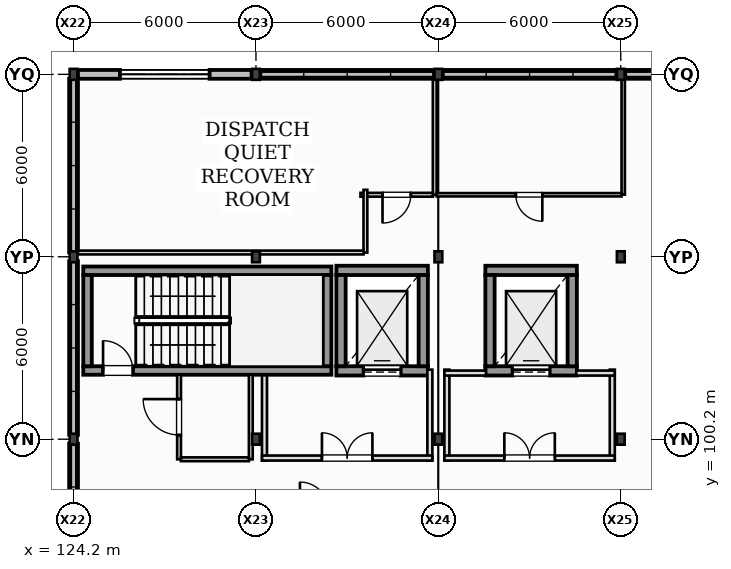
"""IFC4 building model, lengths in metres.
Left out: names, types, materials, properties, quantities, classifications, styles, units other than length and angle.
Written with IfcOpenShell. Run it as: python <this file> out.ifc"""

import sys

from ifc_helpers import new_model, si_unit, direction, frame, frame_2d, origin, origin_2d, place, context, subcontext, project, spatial, rectangle, i_section, extrude, element, fill, save


model = new_model("IFC4")
c1 = context("Model", 3, precision=1e-05, world=origin(), true_north=direction((0.0, 1.0)))
c2 = subcontext(c1, "Body", "Model", "MODEL_VIEW")
j1 = project(units=[si_unit("LENGTHUNIT", "METRE"), si_unit("PLANEANGLEUNIT", "RADIAN")], contexts=[c1])
p1 = place(None, origin())
s1 = spatial("IfcSite", under=j1, at=p1, CompositionType="ELEMENT")
p2 = place(p1, origin())
s2 = spatial("IfcBuilding", under=s1, at=p2, CompositionType="ELEMENT")
p3 = place(p2, frame((0.0, 0.0, 14.0)))
s3 = spatial("IfcBuildingStorey", under=s2, at=p3, CompositionType="ELEMENT", Elevation=14.0)
for number, where, z_axis, x_axis in (
    (1, (124.2, 100.2, 0.0), (0.0, 0.0, 1.0), (1.0, 0.0, 0.0)),
    (2, (124.2, 106.2, 0.0), (0.0, 0.0, 1.0), (1.0, 0.0, 0.0)),
    (3, (124.2, 112.2, 0.0), (0.0, 0.0, 1.0), (1.0, 0.0, 0.0)),
    (4, (130.2, 100.2, 0.0), (0.0, 0.0, 1.0), (1.0, 0.0, 0.0)),
    (5, (130.2, 106.2, 0.0), (0.0, 0.0, 1.0), (1.0, 0.0, 0.0)),
    (6, (130.2, 112.2, 0.0), (0.0, 0.0, 1.0), (1.0, 0.0, 0.0)),
    (7, (136.2, 100.2, 0.0), (0.0, 0.0, 1.0), (1.0, 0.0, 0.0)),
    (8, (136.2, 106.2, 0.0), (0.0, 0.0, 1.0), (1.0, 0.0, 0.0)),
    (9, (136.2, 112.2, 0.0), (0.0, 0.0, 1.0), (1.0, 0.0, 0.0)),
    (10, (142.2, 100.2, 0.0), (0.0, 0.0, 1.0), (1.0, 0.0, 0.0)),
    (11, (142.2, 106.2, 0.0), (0.0, 0.0, 1.0), (1.0, 0.0, 0.0)),
    (12, (142.2, 112.2, 0.0), (0.0, 0.0, 1.0), (1.0, 0.0, 0.0)),
):
    element("IfcColumn", number, at=place(p3, frame(where, z_axis=z_axis, x_axis=x_axis)), inside=s3, PredefinedType="COLUMN", context=c2, shape_type="SweptSolid", body=[
        extrude(i_section(OverallWidth=0.256, OverallDepth=0.36, WebThickness=0.011, FlangeThickness=0.02, at=origin_2d()), origin(), (0.0, 0.0, 1.0), 4.0),
    ])
p4 = place(p3, frame((130.055, 112.2, 0.0), z_axis=(0.0, 0.0, 1.0), x_axis=(-1.0, 0.0, 0.0)))
e13 = element("IfcWall", 13, at=p4, inside=s3, PredefinedType="STANDARD", context=c2, shape_type="SweptSolid", body=[
    extrude(rectangle(XDim=5.71, YDim=0.29, at=frame_2d((2.855, 0.0))), origin(), (0.0, 0.0, 1.0), 3.269),
])
p5 = place(p4, frame((1.38, 0.0, 1.0)))
e14 = element("IfcOpeningElement", 14, at=p5, cuts=e13, PredefinedType="OPENING", context=c2, shape_type="SweptSolid", body=[
    extrude(rectangle(XDim=2.95, YDim=1.55, at=frame_2d((1.475, 0.775))), frame((0.0, 0.155, 0.0), z_axis=(0.0, -1.0, 0.0), x_axis=(1.0, 0.0, 0.0)), (0.0, 0.0, 1.0), 0.31),
])
p6 = place(p3, frame((136.055, 112.2, 0.0), z_axis=(0.0, 0.0, 1.0), x_axis=(-1.0, 0.0, 0.0)))
e15 = element("IfcWall", 15, at=p6, inside=s3, PredefinedType="STANDARD", context=c2, shape_type="SweptSolid", body=[
    extrude(rectangle(XDim=5.71, YDim=0.29, at=frame_2d((2.855, 0.0))), origin(), (0.0, 0.0, 1.0), 0.32),
])
p7 = place(p3, frame((142.055, 112.2, 0.0), z_axis=(0.0, 0.0, 1.0), x_axis=(-1.0, 0.0, 0.0)))
e16 = element("IfcWall", 16, at=p7, inside=s3, PredefinedType="STANDARD", context=c2, shape_type="SweptSolid", body=[
    extrude(rectangle(XDim=5.71, YDim=0.29, at=frame_2d((2.855, 0.0))), origin(), (0.0, 0.0, 1.0), 0.44),
])
p8 = place(p3, frame((148.055, 112.2, 0.0), z_axis=(0.0, 0.0, 1.0), x_axis=(-1.0, 0.0, 0.0)))
e17 = element("IfcWall", 17, at=p8, inside=s3, PredefinedType="STANDARD", context=c2, shape_type="SweptSolid", body=[
    extrude(rectangle(XDim=5.71, YDim=0.29, at=frame_2d((2.855, 0.0))), origin(), (0.0, 0.0, 1.0), 0.56),
])
p9 = place(p3, frame((124.2, 100.055, 0.0), z_axis=(0.0, 0.0, 1.0), x_axis=(0.0, -1.0, 0.0)))
e18 = element("IfcWall", 18, at=p9, inside=s3, PredefinedType="STANDARD", context=c2, shape_type="SweptSolid", body=[
    extrude(rectangle(XDim=5.71, YDim=0.29, at=frame_2d((2.855, 0.0))), origin(), (0.0, 0.0, 1.0), 0.8),
])
p10 = place(p3, frame((124.2, 106.055, 0.0), z_axis=(0.0, 0.0, 1.0), x_axis=(0.0, -1.0, 0.0)))
e19 = element("IfcWall", 19, at=p10, inside=s3, PredefinedType="STANDARD", context=c2, shape_type="SweptSolid", body=[
    extrude(rectangle(XDim=5.71, YDim=0.29, at=frame_2d((2.855, 0.0))), origin(), (0.0, 0.0, 1.0), 0.92),
])
p11 = place(p3, frame((124.2, 112.055, 0.0), z_axis=(0.0, 0.0, 1.0), x_axis=(0.0, -1.0, 0.0)))
e20 = element("IfcWall", 20, at=p11, inside=s3, PredefinedType="STANDARD", context=c2, shape_type="SweptSolid", body=[
    extrude(rectangle(XDim=5.71, YDim=0.29, at=frame_2d((2.855, 0.0))), origin(), (0.0, 0.0, 1.0), 0.32),
])
p12 = place(p3, frame((124.52, 102.46, 0.0), z_axis=(0.0, 0.0, 1.0), x_axis=(1.0, 0.0, 0.0)))
e21 = element("IfcWall", 21, at=p12, inside=s3, PredefinedType="SHEAR", context=c2, shape_type="SweptSolid", body=[
    extrude(rectangle(XDim=8.16, YDim=0.28, at=frame_2d((4.08, 0.0))), origin(), (0.0, 0.0, 1.0), 4.0),
])
p13 = place(p12, frame((0.65, 0.0, 0.0)))
e22 = element("IfcOpeningElement", 22, at=p13, cuts=e21, PredefinedType="OPENING", context=c2, shape_type="SweptSolid", body=[
    extrude(rectangle(XDim=0.98, YDim=2.15, at=frame_2d((0.49, 1.075))), frame((0.0, 0.15, 0.0), z_axis=(0.0, -1.0, 0.0), x_axis=(1.0, 0.0, 0.0)), (0.0, 0.0, 1.0), 0.3),
])
p14 = place(p3, frame((132.68, 105.74, 0.0), z_axis=(0.0, 0.0, 1.0), x_axis=(-1.0, 0.0, 0.0)))
e23 = element("IfcWall", 23, at=p14, inside=s3, PredefinedType="SHEAR", context=c2, shape_type="SweptSolid", body=[
    extrude(rectangle(XDim=8.16, YDim=0.28, at=frame_2d((4.08, 0.0))), origin(), (0.0, 0.0, 1.0), 4.0),
])
for number, where, z_axis, x_axis in (
    (24, (124.66, 105.6, 0.0), (0.0, 0.0, 1.0), (0.0, -1.0, 0.0)),
    (25, (132.54, 102.6, 0.0), (0.0, 0.0, 1.0), (0.0, 1.0, 0.0)),
):
    element("IfcWall", number, at=place(p3, frame(where, z_axis=z_axis, x_axis=x_axis)), inside=s3, PredefinedType="SHEAR", context=c2, shape_type="SweptSolid", body=[
        extrude(rectangle(XDim=3.0, YDim=0.28, at=frame_2d((1.5, 0.0))), origin(), (0.0, 0.0, 1.0), 4.0),
    ])
p15 = place(p3, frame((132.845, 102.448, 0.0), z_axis=(0.0, 0.0, 1.0), x_axis=(1.0, 0.0, 0.0)))
e26 = element("IfcWall", 26, at=p15, inside=s3, PredefinedType="SHEAR", context=c2, shape_type="SweptSolid", body=[
    extrude(rectangle(XDim=3.01, YDim=0.305, at=frame_2d((1.505, 0.0))), origin(), (0.0, 0.0, 1.0), 4.0),
])
p16 = place(p15, frame((0.895, 0.0, 0.0)))
e27 = element("IfcOpeningElement", 27, at=p16, cuts=e26, PredefinedType="OPENING", context=c2, shape_type="SweptSolid", body=[
    extrude(rectangle(XDim=1.22, YDim=2.22, at=frame_2d((0.61, 1.11))), frame((0.0, 0.162, 0.0), z_axis=(0.0, -1.0, 0.0), x_axis=(1.0, 0.0, 0.0)), (0.0, 0.0, 1.0), 0.325),
])
p17 = place(p3, frame((135.855, 105.752, 0.0), z_axis=(0.0, 0.0, 1.0), x_axis=(-1.0, 0.0, 0.0)))
e28 = element("IfcWall", 28, at=p17, inside=s3, PredefinedType="SHEAR", context=c2, shape_type="SweptSolid", body=[
    extrude(rectangle(XDim=3.01, YDim=0.305, at=frame_2d((1.505, 0.0))), origin(), (0.0, 0.0, 1.0), 4.0),
])
for number, where, z_axis, x_axis in (
    (29, (132.998, 105.6, 0.0), (0.0, 0.0, 1.0), (0.0, -1.0, 0.0)),
    (30, (135.702, 102.6, 0.0), (0.0, 0.0, 1.0), (0.0, 1.0, 0.0)),
):
    element("IfcWall", number, at=place(p3, frame(where, z_axis=z_axis, x_axis=x_axis)), inside=s3, PredefinedType="SHEAR", context=c2, shape_type="SweptSolid", body=[
        extrude(rectangle(XDim=3.0, YDim=0.305, at=frame_2d((1.5, 0.0))), origin(), (0.0, 0.0, 1.0), 4.0),
    ])
for number, where, z_axis, x_axis in (
    (31, (130.48, 99.5, 0.0), (0.0, 0.0, 1.0), (0.0, 1.0, 0.0)),
    (32, (135.92, 102.488, 0.0), (0.0, 0.0, 1.0), (0.0, -1.0, 0.0)),
):
    element("IfcWall", number, at=place(p3, frame(where, z_axis=z_axis, x_axis=x_axis)), inside=s3, PredefinedType="PARTITIONING", context=c2, shape_type="SweptSolid", body=[
        extrude(rectangle(XDim=2.988, YDim=0.165, at=frame_2d((1.494, 0.0))), origin(), (0.0, 0.0, 1.0), 3.273),
    ])
p18 = place(p3, frame((130.4, 99.58, 0.0), z_axis=(0.0, 0.0, 1.0), x_axis=(1.0, 0.0, 0.0)))
e33 = element("IfcWall", 33, at=p18, inside=s3, PredefinedType="PARTITIONING", context=c2, shape_type="SweptSolid", body=[
    extrude(rectangle(XDim=5.6, YDim=0.165, at=frame_2d((2.8, 0.0))), origin(), (0.0, 0.0, 1.0), 3.76),
])
p19 = place(p18, frame((1.97, 0.0, 0.0)))
e34 = element("IfcOpeningElement", 34, at=p19, cuts=e33, PredefinedType="OPENING", context=c2, shape_type="SweptSolid", body=[
    extrude(rectangle(XDim=1.66, YDim=2.2, at=frame_2d((0.83, 1.1))), frame((0.0, 0.093, 0.0), z_axis=(0.0, -1.0, 0.0), x_axis=(1.0, 0.0, 0.0)), (0.0, 0.0, 1.0), 0.185),
])
p20 = place(p3, frame((137.745, 102.448, 0.0), z_axis=(0.0, 0.0, 1.0), x_axis=(1.0, 0.0, 0.0)))
e35 = element("IfcWall", 35, at=p20, inside=s3, PredefinedType="SHEAR", context=c2, shape_type="SweptSolid", body=[
    extrude(rectangle(XDim=3.01, YDim=0.305, at=frame_2d((1.505, 0.0))), origin(), (0.0, 0.0, 1.0), 4.0),
])
p21 = place(p20, frame((0.895, 0.0, 0.0)))
e36 = element("IfcOpeningElement", 36, at=p21, cuts=e35, PredefinedType="OPENING", context=c2, shape_type="SweptSolid", body=[
    extrude(rectangle(XDim=1.22, YDim=2.22, at=frame_2d((0.61, 1.11))), frame((0.0, 0.162, 0.0), z_axis=(0.0, -1.0, 0.0), x_axis=(1.0, 0.0, 0.0)), (0.0, 0.0, 1.0), 0.325),
])
p22 = place(p3, frame((140.755, 105.752, 0.0), z_axis=(0.0, 0.0, 1.0), x_axis=(-1.0, 0.0, 0.0)))
e37 = element("IfcWall", 37, at=p22, inside=s3, PredefinedType="SHEAR", context=c2, shape_type="SweptSolid", body=[
    extrude(rectangle(XDim=3.01, YDim=0.305, at=frame_2d((1.505, 0.0))), origin(), (0.0, 0.0, 1.0), 4.0),
])
for number, where, z_axis, x_axis in (
    (38, (137.897, 105.6, 0.0), (0.0, 0.0, 1.0), (0.0, -1.0, 0.0)),
    (39, (140.603, 102.6, 0.0), (0.0, 0.0, 1.0), (0.0, 1.0, 0.0)),
):
    element("IfcWall", number, at=place(p3, frame(where, z_axis=z_axis, x_axis=x_axis)), inside=s3, PredefinedType="SHEAR", context=c2, shape_type="SweptSolid", body=[
        extrude(rectangle(XDim=3.0, YDim=0.305, at=frame_2d((1.5, 0.0))), origin(), (0.0, 0.0, 1.0), 4.0),
    ])
for number, where, z_axis, x_axis in (
    (40, (136.48, 99.5, 0.0), (0.0, 0.0, 1.0), (0.0, 1.0, 0.0)),
    (41, (141.92, 102.488, 0.0), (0.0, 0.0, 1.0), (0.0, -1.0, 0.0)),
):
    element("IfcWall", number, at=place(p3, frame(where, z_axis=z_axis, x_axis=x_axis)), inside=s3, PredefinedType="PARTITIONING", context=c2, shape_type="SweptSolid", body=[
        extrude(rectangle(XDim=2.988, YDim=0.165, at=frame_2d((1.494, 0.0))), origin(), (0.0, 0.0, 1.0), 3.273),
    ])
p23 = place(p3, frame((136.4, 102.375, 0.0), z_axis=(0.0, 0.0, 1.0), x_axis=(1.0, 0.0, 0.0)))
e42 = element("IfcWall", 42, at=p23, inside=s3, PredefinedType="PARTITIONING", context=c2, shape_type="SweptSolid", body=[
    extrude(rectangle(XDim=1.365, YDim=0.165, at=frame_2d((0.683, 0.0))), origin(), (0.0, 0.0, 1.0), 3.76),
])
p24 = place(p3, frame((140.735, 102.375, 0.0), z_axis=(0.0, 0.0, 1.0), x_axis=(1.0, 0.0, 0.0)))
e43 = element("IfcWall", 43, at=p24, inside=s3, PredefinedType="PARTITIONING", context=c2, shape_type="SweptSolid", body=[
    extrude(rectangle(XDim=1.265, YDim=0.165, at=frame_2d((0.632, 0.0))), origin(), (0.0, 0.0, 1.0), 3.76),
])
p25 = place(p3, frame((136.4, 99.58, 0.0), z_axis=(0.0, 0.0, 1.0), x_axis=(1.0, 0.0, 0.0)))
e44 = element("IfcWall", 44, at=p25, inside=s3, PredefinedType="PARTITIONING", context=c2, shape_type="SweptSolid", body=[
    extrude(rectangle(XDim=5.6, YDim=0.165, at=frame_2d((2.8, 0.0))), origin(), (0.0, 0.0, 1.0), 3.76),
])
p26 = place(p25, frame((1.97, 0.0, 0.0)))
e45 = element("IfcOpeningElement", 45, at=p26, cuts=e44, PredefinedType="OPENING", context=c2, shape_type="SweptSolid", body=[
    extrude(rectangle(XDim=1.66, YDim=2.2, at=frame_2d((0.83, 1.1))), frame((0.0, 0.093, 0.0), z_axis=(0.0, -1.0, 0.0), x_axis=(1.0, 0.0, 0.0)), (0.0, 0.0, 1.0), 0.185),
])
p27 = place(p3, frame((136.08, 112.055, 0.0), z_axis=(0.0, 0.0, 1.0), x_axis=(0.0, -1.0, 0.0)))
e46 = element("IfcWall", 46, at=p27, inside=s3, PredefinedType="PARTITIONING", context=c2, shape_type="SweptSolid", body=[
    extrude(rectangle(XDim=3.817, YDim=0.125, at=frame_2d((1.909, 0.0))), origin(), (0.0, 0.0, 1.0), 3.273),
])
p28 = place(p3, frame((136.018, 108.24, 0.0), z_axis=(0.0, 0.0, 1.0), x_axis=(-1.0, 0.0, 0.0)))
e47 = element("IfcWall", 47, at=p28, inside=s3, PredefinedType="PARTITIONING", context=c2, shape_type="SweptSolid", body=[
    extrude(rectangle(XDim=2.38, YDim=0.125, at=frame_2d((1.19, 0.0))), origin(), (0.0, 0.0, 1.0), 3.76),
])
p29 = place(p28, frame((0.725, 0.0, 0.0)))
e48 = element("IfcOpeningElement", 48, at=p29, cuts=e47, PredefinedType="OPENING", context=c2, shape_type="SweptSolid", body=[
    extrude(rectangle(XDim=0.93, YDim=2.1, at=frame_2d((0.465, 1.05))), frame((0.0, 0.073, 0.0), z_axis=(0.0, -1.0, 0.0), x_axis=(1.0, 0.0, 0.0)), (0.0, 0.0, 1.0), 0.145),
])
p30 = place(p3, frame((133.8, 108.403, 0.0), z_axis=(0.0, 0.0, 1.0), x_axis=(0.0, -1.0, 0.0)))
e49 = element("IfcWall", 49, at=p30, inside=s3, PredefinedType="PARTITIONING", context=c2, shape_type="SweptSolid", body=[
    extrude(rectangle(XDim=2.065, YDim=0.125, at=frame_2d((1.033, 0.0))), origin(), (0.0, 0.0, 1.0), 3.76),
])
p31 = place(p3, frame((133.738, 106.34, 0.0), z_axis=(0.0, 0.0, 1.0), x_axis=(-1.0, 0.0, 0.0)))
e50 = element("IfcWall", 50, at=p31, inside=s3, PredefinedType="PARTITIONING", context=c2, shape_type="SweptSolid", body=[
    extrude(rectangle(XDim=9.393, YDim=0.125, at=frame_2d((4.696, 0.0))), origin(), (0.0, 0.0, 1.0), 3.269),
])
p32 = place(p3, frame((142.28, 112.055, 0.0), z_axis=(0.0, 0.0, 1.0), x_axis=(0.0, -1.0, 0.0)))
e51 = element("IfcWall", 51, at=p32, inside=s3, PredefinedType="PARTITIONING", context=c2, shape_type="SweptSolid", body=[
    extrude(rectangle(XDim=3.81, YDim=0.11, at=frame_2d((1.905, 0.0))), origin(), (0.0, 0.0, 1.0), 3.273),
])
p33 = place(p3, frame((142.225, 108.24, 0.0), z_axis=(0.0, 0.0, 1.0), x_axis=(-1.0, 0.0, 0.0)))
e52 = element("IfcWall", 52, at=p33, inside=s3, PredefinedType="PARTITIONING", context=c2, shape_type="SweptSolid", body=[
    extrude(rectangle(XDim=6.083, YDim=0.11, at=frame_2d((3.041, 0.0))), origin(), (0.0, 0.0, 1.0), 3.76),
])
p34 = place(p33, frame((2.606, 0.0, 0.0)))
e53 = element("IfcOpeningElement", 53, at=p34, cuts=e52, PredefinedType="OPENING", context=c2, shape_type="SweptSolid", body=[
    extrude(rectangle(XDim=0.87, YDim=2.06, at=frame_2d((0.435, 1.03))), frame((0.0, 0.065, 0.0), z_axis=(0.0, -1.0, 0.0), x_axis=(1.0, 0.0, 0.0)), (0.0, 0.0, 1.0), 0.13),
])
p35 = place(p3, frame((127.67, 99.538, 0.0), z_axis=(0.0, 0.0, 1.0), x_axis=(0.0, 1.0, 0.0)))
e54 = element("IfcWall", 54, at=p35, inside=s3, PredefinedType="PARTITIONING", context=c2, shape_type="SweptSolid", body=[
    extrude(rectangle(XDim=2.782, YDim=0.125, at=frame_2d((1.391, 0.0))), origin(), (0.0, 0.0, 1.0), 3.76),
])
p36 = place(p35, frame((0.801, 0.0, 0.0)))
e55 = element("IfcOpeningElement", 55, at=p36, cuts=e54, PredefinedType="OPENING", context=c2, shape_type="SweptSolid", body=[
    extrude(rectangle(XDim=1.18, YDim=2.16, at=frame_2d((0.59, 1.08))), frame((0.0, 0.073, 0.0), z_axis=(0.0, -1.0, 0.0), x_axis=(1.0, 0.0, 0.0)), (0.0, 0.0, 1.0), 0.145),
])
p37 = place(p3, frame((130.03, 102.32, 0.0), z_axis=(0.0, 0.0, 1.0), x_axis=(0.0, -1.0, 0.0)))
e56 = element("IfcWall", 56, at=p37, inside=s3, PredefinedType="PARTITIONING", context=c2, shape_type="SweptSolid", body=[
    extrude(rectangle(XDim=2.782, YDim=0.125, at=frame_2d((1.391, 0.0))), origin(), (0.0, 0.0, 1.0), 3.273),
])
p38 = place(p3, frame((129.968, 99.54, 0.0), z_axis=(0.0, 0.0, 1.0), x_axis=(-1.0, 0.0, 0.0)))
e57 = element("IfcWall", 57, at=p38, inside=s3, PredefinedType="PARTITIONING", context=c2, shape_type="SweptSolid", body=[
    extrude(rectangle(XDim=2.235, YDim=0.125, at=frame_2d((1.118, 0.0))), origin(), (0.0, 0.0, 1.0), 3.76),
])
p39 = place(p5, origin())
e58 = element("IfcWindow", 58, at=p39, inside=s3, PartitioningType="SINGLE_PANEL", PredefinedType="WINDOW", context=c2, shape_type="SweptSolid", body=[
    extrude(rectangle(XDim=2.95, YDim=1.55, at=frame_2d((1.475, 0.775))), frame((0.0, 0.03, 0.0), z_axis=(0.0, -1.0, 0.0), x_axis=(1.0, 0.0, 0.0)), (0.0, 0.0, 1.0), 0.06),
])
fill(e14, e58)
p40 = place(p13, origin())
e59 = element("IfcDoor", 59, at=p40, inside=s3, OperationType="SINGLE_SWING_LEFT", PredefinedType="DOOR", context=c2, shape_type="SweptSolid", body=[
    extrude(rectangle(XDim=0.98, YDim=2.15, at=frame_2d((0.49, 1.075))), frame((0.0, 0.025, 0.0), z_axis=(0.0, -1.0, 0.0), x_axis=(1.0, 0.0, 0.0)), (0.0, 0.0, 1.0), 0.05),
])
fill(e22, e59)
p41 = place(p16, origin())
e60 = element("IfcDoor", 60, at=p41, inside=s3, OperationType="SLIDING_TO_LEFT", PredefinedType="DOOR", context=c2, shape_type="SweptSolid", body=[
    extrude(rectangle(XDim=1.22, YDim=2.22, at=frame_2d((0.61, 1.11))), frame((0.0, 0.025, 0.0), z_axis=(0.0, -1.0, 0.0), x_axis=(1.0, 0.0, 0.0)), (0.0, 0.0, 1.0), 0.05),
])
fill(e27, e60)
p42 = place(p19, frame((1.66, 0.0, 0.0), z_axis=(0.0, 0.0, 1.0), x_axis=(-1.0, 0.0, 0.0)))
e61 = element("IfcDoor", 61, at=p42, inside=s3, OperationType="DOUBLE_DOOR_SINGLE_SWING", PredefinedType="DOOR", context=c2, shape_type="SweptSolid", body=[
    extrude(rectangle(XDim=1.66, YDim=2.2, at=frame_2d((0.83, 1.1))), frame((0.0, 0.025, 0.0), z_axis=(0.0, -1.0, 0.0), x_axis=(1.0, 0.0, 0.0)), (0.0, 0.0, 1.0), 0.05),
])
fill(e34, e61)
p43 = place(p21, origin())
e62 = element("IfcDoor", 62, at=p43, inside=s3, OperationType="SLIDING_TO_LEFT", PredefinedType="DOOR", context=c2, shape_type="SweptSolid", body=[
    extrude(rectangle(XDim=1.22, YDim=2.22, at=frame_2d((0.61, 1.11))), frame((0.0, 0.025, 0.0), z_axis=(0.0, -1.0, 0.0), x_axis=(1.0, 0.0, 0.0)), (0.0, 0.0, 1.0), 0.05),
])
fill(e36, e62)
p44 = place(p26, frame((1.66, 0.0, 0.0), z_axis=(0.0, 0.0, 1.0), x_axis=(-1.0, 0.0, 0.0)))
e63 = element("IfcDoor", 63, at=p44, inside=s3, OperationType="DOUBLE_DOOR_SINGLE_SWING", PredefinedType="DOOR", context=c2, shape_type="SweptSolid", body=[
    extrude(rectangle(XDim=1.66, YDim=2.2, at=frame_2d((0.83, 1.1))), frame((0.0, 0.025, 0.0), z_axis=(0.0, -1.0, 0.0), x_axis=(1.0, 0.0, 0.0)), (0.0, 0.0, 1.0), 0.05),
])
fill(e45, e63)
p45 = place(p29, frame((0.93, 0.0, 0.0), z_axis=(0.0, 0.0, 1.0), x_axis=(-1.0, 0.0, 0.0)))
e64 = element("IfcDoor", 64, at=p45, inside=s3, OperationType="SINGLE_SWING_RIGHT", PredefinedType="DOOR", context=c2, shape_type="SweptSolid", body=[
    extrude(rectangle(XDim=0.93, YDim=2.1, at=frame_2d((0.465, 1.05))), frame((0.0, 0.025, 0.0), z_axis=(0.0, -1.0, 0.0), x_axis=(1.0, 0.0, 0.0)), (0.0, 0.0, 1.0), 0.05),
])
fill(e48, e64)
p46 = place(p34, frame((0.87, 0.0, 0.0), z_axis=(0.0, 0.0, 1.0), x_axis=(-1.0, 0.0, 0.0)))
e65 = element("IfcDoor", 65, at=p46, inside=s3, OperationType="SINGLE_SWING_LEFT", PredefinedType="DOOR", context=c2, shape_type="SweptSolid", body=[
    extrude(rectangle(XDim=0.87, YDim=2.06, at=frame_2d((0.435, 1.03))), frame((0.0, 0.025, 0.0), z_axis=(0.0, -1.0, 0.0), x_axis=(1.0, 0.0, 0.0)), (0.0, 0.0, 1.0), 0.05),
])
fill(e53, e65)
p47 = place(p36, frame((1.18, 0.0, 0.0), z_axis=(0.0, 0.0, 1.0), x_axis=(-1.0, 0.0, 0.0)))
e66 = element("IfcDoor", 66, at=p47, inside=s3, OperationType="SINGLE_SWING_RIGHT", PredefinedType="DOOR", context=c2, shape_type="SweptSolid", body=[
    extrude(rectangle(XDim=1.18, YDim=2.16, at=frame_2d((0.59, 1.08))), frame((0.0, 0.025, 0.0), z_axis=(0.0, -1.0, 0.0), x_axis=(1.0, 0.0, 0.0)), (0.0, 0.0, 1.0), 0.05),
])
fill(e55, e66)
save(model, sys.argv[1])
